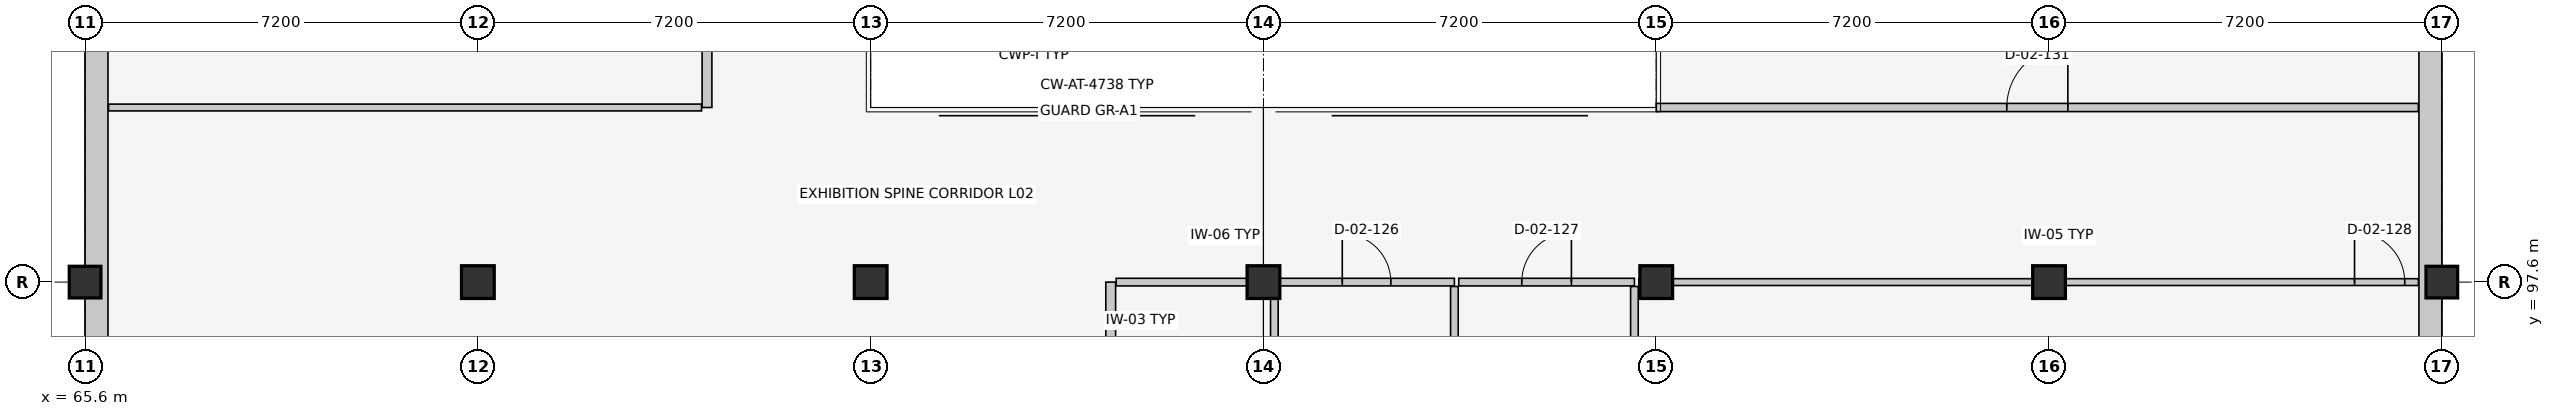
"""IFC4 building model, lengths in metres.
Left out: names, types, materials, properties, quantities, classifications, styles, units other than length and angle.
Written with IfcOpenShell. Run it as: python <this file> out.ifc"""

import sys

from ifc_helpers import new_model, si_unit, direction, frame, frame_2d, origin, origin_2d, place, context, subcontext, project, spatial, rectangle, extrude, element, fill, save


model = new_model("IFC4")
c1 = context("Model", 3, precision=1e-05, world=origin(), true_north=direction((0.0, 1.0)))
c2 = subcontext(c1, "Body", "Model", "MODEL_VIEW")
j1 = project(units=[si_unit("LENGTHUNIT", "METRE"), si_unit("PLANEANGLEUNIT", "RADIAN")], contexts=[c1])
p1 = place(None, origin())
s1 = spatial("IfcSite", under=j1, at=p1, CompositionType="ELEMENT")
p2 = place(p1, origin())
s2 = spatial("IfcBuilding", under=s1, at=p2, CompositionType="ELEMENT")
p3 = place(p2, frame((0.0, 0.0, 9.6)))
s3 = spatial("IfcBuildingStorey", under=s2, at=p3, CompositionType="ELEMENT", Elevation=9.6)
p4 = place(p3, frame((65.6, 97.6, 0.0), z_axis=(0.0, 0.0, 1.0), x_axis=(1.0, 0.0, 0.0)))
e1 = element("IfcColumn", 1, at=p4, inside=s3, PredefinedType="COLUMN", context=c2, shape_type="SweptSolid", body=[
    extrude(rectangle(XDim=0.58, YDim=0.58, at=origin_2d()), origin(), (0.0, 0.0, 1.0), 4.2),
])
for number, where, z_axis, x_axis in (
    (2, (72.8, 97.6, 0.0), (0.0, 0.0, 1.0), (1.0, 0.0, 0.0)),
    (3, (80.0, 97.6, 0.0), (0.0, 0.0, 1.0), (1.0, 0.0, 0.0)),
    (4, (87.2, 97.6, 0.0), (0.0, 0.0, 1.0), (1.0, 0.0, 0.0)),
    (5, (94.4, 97.6, 0.0), (0.0, 0.0, 1.0), (1.0, 0.0, 0.0)),
    (6, (101.6, 97.6, 0.0), (0.0, 0.0, 1.0), (1.0, 0.0, 0.0)),
):
    element("IfcColumn", number, at=place(p3, frame(where, z_axis=z_axis, x_axis=x_axis)), inside=s3, PredefinedType="COLUMN", context=c2, shape_type="SweptSolid", body=[
        extrude(rectangle(XDim=0.6, YDim=0.6, at=origin_2d()), origin(), (0.0, 0.0, 1.0), 4.2),
    ])
p5 = place(p3, frame((108.8, 97.6, 0.0), z_axis=(0.0, 0.0, 1.0), x_axis=(1.0, 0.0, 0.0)))
e7 = element("IfcColumn", 7, at=p5, inside=s3, PredefinedType="COLUMN", context=c2, shape_type="SweptSolid", body=[
    extrude(rectangle(XDim=0.58, YDim=0.58, at=origin_2d()), origin(), (0.0, 0.0, 1.0), 4.2),
])
p6 = place(p3, frame((108.59, 119.0, 0.0), z_axis=(0.0, 0.0, 1.0), x_axis=(0.0, -1.0, 0.0)))
e8 = element("IfcWall", 8, at=p6, inside=s3, PredefinedType="SOLIDWALL", context=c2, shape_type="SweptSolid", body=[
    extrude(rectangle(XDim=28.6, YDim=0.42, at=frame_2d((14.3, 0.0))), origin(), (0.0, 0.0, 1.0), 3.345),
])
p7 = place(p6, frame((1.318, 0.0, 0.9)))
e9 = element("IfcOpeningElement", 9, at=p7, cuts=e8, PredefinedType="OPENING", context=c2, shape_type="SweptSolid", body=[
    extrude(rectangle(XDim=1.45, YDim=1.45, at=frame_2d((0.725, 0.725))), frame((0.0, 0.222, 0.0), z_axis=(0.0, -1.0, 0.0), x_axis=(1.0, 0.0, 0.0)), (0.0, 0.0, 1.0), 0.444),
])
p8 = place(p6, frame((9.689, 0.0, 0.9)))
e10 = element("IfcOpeningElement", 10, at=p8, cuts=e8, PredefinedType="OPENING", context=c2, shape_type="SweptSolid", body=[
    extrude(rectangle(XDim=1.05, YDim=1.6, at=frame_2d((0.525, 0.8))), frame((0.0, 0.222, 0.0), z_axis=(0.0, -1.0, 0.0), x_axis=(1.0, 0.0, 0.0)), (0.0, 0.0, 1.0), 0.444),
])
p9 = place(p6, frame((25.807, 0.0, 0.9)))
e11 = element("IfcOpeningElement", 11, at=p9, cuts=e8, PredefinedType="OPENING", context=c2, shape_type="SweptSolid", body=[
    extrude(rectangle(XDim=1.5, YDim=1.6, at=frame_2d((0.75, 0.8))), frame((0.0, 0.222, 0.0), z_axis=(0.0, -1.0, 0.0), x_axis=(1.0, 0.0, 0.0)), (0.0, 0.0, 1.0), 0.444),
])
p10 = place(p3, frame((65.81, 90.4, 0.0), z_axis=(0.0, 0.0, 1.0), x_axis=(0.0, 1.0, 0.0)))
e12 = element("IfcWall", 12, at=p10, inside=s3, PredefinedType="SOLIDWALL", context=c2, shape_type="SweptSolid", body=[
    extrude(rectangle(XDim=28.6, YDim=0.42, at=frame_2d((14.3, 0.0))), origin(), (0.0, 0.0, 1.0), 3.315),
])
p11 = place(p10, frame((1.568, 0.0, 0.9)))
e13 = element("IfcOpeningElement", 13, at=p11, cuts=e12, PredefinedType="OPENING", context=c2, shape_type="SweptSolid", body=[
    extrude(rectangle(XDim=0.95, YDim=1.45, at=frame_2d((0.475, 0.725))), frame((0.0, 0.222, 0.0), z_axis=(0.0, -1.0, 0.0), x_axis=(1.0, 0.0, 0.0)), (0.0, 0.0, 1.0), 0.444),
])
p12 = place(p10, frame((17.711, 0.0, 0.9)))
e14 = element("IfcOpeningElement", 14, at=p12, cuts=e12, PredefinedType="OPENING", context=c2, shape_type="SweptSolid", body=[
    extrude(rectangle(XDim=1.35, YDim=1.45, at=frame_2d((0.675, 0.725))), frame((0.0, 0.222, 0.0), z_axis=(0.0, -1.0, 0.0), x_axis=(1.0, 0.0, 0.0)), (0.0, 0.0, 1.0), 0.444),
])
p13 = place(p10, frame((26.107, 0.0, 0.9)))
e15 = element("IfcOpeningElement", 15, at=p13, cuts=e12, PredefinedType="OPENING", context=c2, shape_type="SweptSolid", body=[
    extrude(rectangle(XDim=0.9, YDim=1.6, at=frame_2d((0.45, 0.8))), frame((0.0, 0.222, 0.0), z_axis=(0.0, -1.0, 0.0), x_axis=(1.0, 0.0, 0.0)), (0.0, 0.0, 1.0), 0.444),
])
p14 = place(p3, frame((84.4, 94.0, 0.0), z_axis=(0.0, 0.0, 1.0), x_axis=(0.0, 1.0, 0.0)))
e16 = element("IfcWall", 16, at=p14, inside=s3, PredefinedType="PARTITIONING", context=c2, shape_type="SweptSolid", body=[
    extrude(rectangle(XDim=3.6, YDim=0.18, at=frame_2d((1.8, 0.0))), origin(), (0.0, 0.0, 1.0), 3.92),
])
p15 = place(p14, frame((1.27, 0.0, 0.0)))
e17 = element("IfcOpeningElement", 17, at=p15, cuts=e16, PredefinedType="OPENING", context=c2, shape_type="SweptSolid", body=[
    extrude(rectangle(XDim=1.06, YDim=2.1, at=frame_2d((0.53, 1.05))), frame((0.0, 0.102, 0.0), z_axis=(0.0, -1.0, 0.0), x_axis=(1.0, 0.0, 0.0)), (0.0, 0.0, 1.0), 0.204),
])
p16 = place(p3, frame((84.5, 97.6, 0.0), z_axis=(0.0, 0.0, 1.0), x_axis=(1.0, 0.0, 0.0)))
e18 = element("IfcWall", 18, at=p16, inside=s3, PredefinedType="PARTITIONING", context=c2, shape_type="SweptSolid", body=[
    extrude(rectangle(XDim=2.9, YDim=0.14, at=frame_2d((1.45, 0.0))), origin(), (0.0, 0.0, 1.0), 3.095),
])
p17 = place(p3, frame((87.4, 90.8, 0.0), z_axis=(0.0, 0.0, 1.0), x_axis=(0.0, 1.0, 0.0)))
e19 = element("IfcWall", 19, at=p17, inside=s3, PredefinedType="PARTITIONING", context=c2, shape_type="SweptSolid", body=[
    extrude(rectangle(XDim=6.72, YDim=0.14, at=frame_2d((3.36, 0.0))), origin(), (0.0, 0.0, 1.0), 3.295),
])
p18 = place(p3, frame((87.48, 97.6, 0.0), z_axis=(0.0, 0.0, 1.0), x_axis=(1.0, 0.0, 0.0)))
e20 = element("IfcWall", 20, at=p18, inside=s3, PredefinedType="PARTITIONING", context=c2, shape_type="SweptSolid", body=[
    extrude(rectangle(XDim=3.22, YDim=0.14, at=frame_2d((1.61, 0.0))), origin(), (0.0, 0.0, 1.0), 3.045),
])
p19 = place(p18, frame((1.165, 0.0, 0.0)))
e21 = element("IfcOpeningElement", 21, at=p19, cuts=e20, PredefinedType="OPENING", context=c2, shape_type="SweptSolid", body=[
    extrude(rectangle(XDim=0.89, YDim=2.05, at=frame_2d((0.445, 1.025))), frame((0.0, 0.082, 0.0), z_axis=(0.0, -1.0, 0.0), x_axis=(1.0, 0.0, 0.0)), (0.0, 0.0, 1.0), 0.164),
])
p20 = place(p3, frame((90.7, 90.8, 0.0), z_axis=(0.0, 0.0, 1.0), x_axis=(0.0, 1.0, 0.0)))
e22 = element("IfcWall", 22, at=p20, inside=s3, PredefinedType="PARTITIONING", context=c2, shape_type="SweptSolid", body=[
    extrude(rectangle(XDim=6.72, YDim=0.14, at=frame_2d((3.36, 0.0))), origin(), (0.0, 0.0, 1.0), 3.495),
])
p21 = place(p3, frame((90.78, 97.6, 0.0), z_axis=(0.0, 0.0, 1.0), x_axis=(1.0, 0.0, 0.0)))
e23 = element("IfcWall", 23, at=p21, inside=s3, PredefinedType="PARTITIONING", context=c2, shape_type="SweptSolid", body=[
    extrude(rectangle(XDim=3.22, YDim=0.14, at=frame_2d((1.61, 0.0))), origin(), (0.0, 0.0, 1.0), 3.045),
])
p22 = place(p21, frame((1.155, 0.0, 0.0)))
e24 = element("IfcOpeningElement", 24, at=p22, cuts=e23, PredefinedType="OPENING", context=c2, shape_type="SweptSolid", body=[
    extrude(rectangle(XDim=0.91, YDim=2.06, at=frame_2d((0.455, 1.03))), frame((0.0, 0.082, 0.0), z_axis=(0.0, -1.0, 0.0), x_axis=(1.0, 0.0, 0.0)), (0.0, 0.0, 1.0), 0.164),
])
p23 = place(p3, frame((94.0, 90.8, 0.0), z_axis=(0.0, 0.0, 1.0), x_axis=(0.0, 1.0, 0.0)))
e25 = element("IfcWall", 25, at=p23, inside=s3, PredefinedType="PARTITIONING", context=c2, shape_type="SweptSolid", body=[
    extrude(rectangle(XDim=6.72, YDim=0.14, at=frame_2d((3.36, 0.0))), origin(), (0.0, 0.0, 1.0), 3.92),
])
p24 = place(p3, frame((94.08, 97.6, 0.0), z_axis=(0.0, 0.0, 1.0), x_axis=(1.0, 0.0, 0.0)))
e26 = element("IfcWall", 26, at=p24, inside=s3, PredefinedType="PARTITIONING", context=c2, shape_type="SweptSolid", body=[
    extrude(rectangle(XDim=14.29, YDim=0.125, at=frame_2d((7.145, 0.0))), origin(), (0.0, 0.0, 1.0), 3.235),
])
p25 = place(p24, frame((13.12, 0.0, 0.0)))
e27 = element("IfcOpeningElement", 27, at=p25, cuts=e26, PredefinedType="OPENING", context=c2, shape_type="SweptSolid", body=[
    extrude(rectangle(XDim=0.92, YDim=2.08, at=frame_2d((0.46, 1.04))), frame((0.0, 0.074, 0.0), z_axis=(0.0, -1.0, 0.0), x_axis=(1.0, 0.0, 0.0)), (0.0, 0.0, 1.0), 0.149),
])
p26 = place(p3, frame((77.0, 100.8, 0.0), z_axis=(0.0, 0.0, 1.0), x_axis=(0.0, 1.0, 0.0)))
e28 = element("IfcWall", 28, at=p26, inside=s3, PredefinedType="PARTITIONING", context=c2, shape_type="SweptSolid", body=[
    extrude(rectangle(XDim=17.77, YDim=0.18, at=frame_2d((8.885, 0.0))), origin(), (0.0, 0.0, 1.0), 3.92),
])
p27 = place(p26, frame((8.245, 0.0, 0.0)))
e29 = element("IfcOpeningElement", 29, at=p27, cuts=e28, PredefinedType="OPENING", context=c2, shape_type="SweptSolid", body=[
    extrude(rectangle(XDim=1.28, YDim=2.2, at=frame_2d((0.64, 1.1))), frame((0.0, 0.102, 0.0), z_axis=(0.0, -1.0, 0.0), x_axis=(1.0, 0.0, 0.0)), (0.0, 0.0, 1.0), 0.204),
])
p28 = place(p3, frame((66.03, 100.8, 0.0), z_axis=(0.0, 0.0, 1.0), x_axis=(1.0, 0.0, 0.0)))
e30 = element("IfcWall", 30, at=p28, inside=s3, PredefinedType="PARTITIONING", context=c2, shape_type="SweptSolid", body=[
    extrude(rectangle(XDim=10.87, YDim=0.125, at=frame_2d((5.435, 0.0))), origin(), (0.0, 0.0, 1.0), 3.92),
])
p29 = place(p3, frame((94.4, 100.8, 0.0), z_axis=(0.0, 0.0, 1.0), x_axis=(1.0, 0.0, 0.0)))
e31 = element("IfcWall", 31, at=p29, inside=s3, PredefinedType="PARTITIONING", context=c2, shape_type="SweptSolid", body=[
    extrude(rectangle(XDim=13.97, YDim=0.15, at=frame_2d((6.985, 0.0))), origin(), (0.0, 0.0, 1.0), 3.92),
])
p30 = place(p29, frame((6.425, 0.0, 0.0)))
e32 = element("IfcOpeningElement", 32, at=p30, cuts=e31, PredefinedType="OPENING", context=c2, shape_type="SweptSolid", body=[
    extrude(rectangle(XDim=1.12, YDim=2.15, at=frame_2d((0.56, 1.075))), frame((0.0, 0.087, 0.0), z_axis=(0.0, -1.0, 0.0), x_axis=(1.0, 0.0, 0.0)), (0.0, 0.0, 1.0), 0.174),
])
p31 = place(p19, origin())
e33 = element("IfcDoor", 33, at=p31, inside=s3, OperationType="SINGLE_SWING_LEFT", PredefinedType="DOOR", context=c2, shape_type="SweptSolid", body=[
    extrude(rectangle(XDim=0.89, YDim=2.05, at=frame_2d((0.445, 1.025))), frame((0.0, 0.025, 0.0), z_axis=(0.0, -1.0, 0.0), x_axis=(1.0, 0.0, 0.0)), (0.0, 0.0, 1.0), 0.05),
])
fill(e21, e33)
p32 = place(p22, origin())
e34 = element("IfcDoor", 34, at=p32, inside=s3, OperationType="SINGLE_SWING_RIGHT", PredefinedType="DOOR", context=c2, shape_type="SweptSolid", body=[
    extrude(rectangle(XDim=0.91, YDim=2.06, at=frame_2d((0.455, 1.03))), frame((0.0, 0.025, 0.0), z_axis=(0.0, -1.0, 0.0), x_axis=(1.0, 0.0, 0.0)), (0.0, 0.0, 1.0), 0.05),
])
fill(e24, e34)
p33 = place(p25, origin())
e35 = element("IfcDoor", 35, at=p33, inside=s3, OperationType="SINGLE_SWING_LEFT", PredefinedType="DOOR", context=c2, shape_type="SweptSolid", body=[
    extrude(rectangle(XDim=0.92, YDim=2.08, at=frame_2d((0.46, 1.04))), frame((0.0, 0.025, 0.0), z_axis=(0.0, -1.0, 0.0), x_axis=(1.0, 0.0, 0.0)), (0.0, 0.0, 1.0), 0.05),
])
fill(e27, e35)
p34 = place(p30, origin())
e36 = element("IfcDoor", 36, at=p34, inside=s3, OperationType="SINGLE_SWING_RIGHT", PredefinedType="DOOR", context=c2, shape_type="SweptSolid", body=[
    extrude(rectangle(XDim=1.12, YDim=2.15, at=frame_2d((0.56, 1.075))), frame((0.0, 0.025, 0.0), z_axis=(0.0, -1.0, 0.0), x_axis=(1.0, 0.0, 0.0)), (0.0, 0.0, 1.0), 0.05),
])
fill(e32, e36)
save(model, sys.argv[1])
